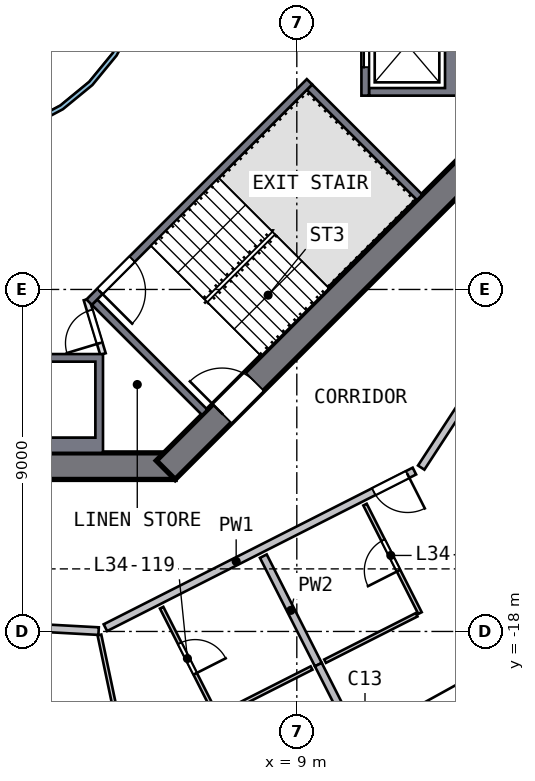
"""IFC4 building model, lengths in metres.
Left out: names, types, materials, properties, quantities, classifications, styles, units other than length and angle.
Written with IfcOpenShell. Run it as: python <this file> out.ifc"""

import sys

from ifc_helpers import new_model, si_unit, direction, frame, frame_2d, origin, place, context, subcontext, project, spatial, polyline, rectangle, outline, extrude, element, fill, save


model = new_model("IFC4")
c1 = context("Model", 3, precision=1e-05, world=origin(), true_north=direction((0.0, 1.0)))
c2 = subcontext(c1, "Body", "Model", "MODEL_VIEW")
j1 = project(units=[si_unit("LENGTHUNIT", "METRE"), si_unit("PLANEANGLEUNIT", "RADIAN")], contexts=[c1])
p1 = place(None, origin())
s1 = spatial("IfcSite", under=j1, at=p1, CompositionType="ELEMENT")
p2 = place(p1, origin())
s2 = spatial("IfcBuilding", under=s1, at=p2, CompositionType="ELEMENT")
p3 = place(p2, frame((0.0, 0.0, 143.5)))
s3 = spatial("IfcBuildingStorey", under=s2, at=p3, CompositionType="ELEMENT", Elevation=143.5)
p4 = place(p3, frame((-5.799, -13.65, 0.0), z_axis=(0.0, 0.0, 1.0), x_axis=(1.0, 0.0, 0.0)))
e1 = element("IfcWall", 1, at=p4, inside=s3, PredefinedType="SHEAR", context=c2, shape_type="SweptSolid", body=[
    extrude(rectangle(XDim=11.598, YDim=0.7, at=frame_2d((5.799, 0.0))), origin(), (0.0, 0.0, 1.0), 3.5),
])
p5 = place(p4, frame((4.899, 0.0, 0.0)))
e2 = element("IfcOpeningElement", 2, at=p5, cuts=e1, PredefinedType="OPENING", context=c2, shape_type="SweptSolid", body=[
    extrude(rectangle(XDim=1.8, YDim=2.1, at=frame_2d((0.9, 1.05))), frame((0.0, 0.36, 0.0), z_axis=(0.0, -1.0, 0.0), x_axis=(1.0, 0.0, 0.0)), (0.0, 0.0, 1.0), 0.72),
])
p6 = place(p3, frame((5.552, -13.752, 0.0), z_axis=(0.0, 0.0, 1.0), x_axis=(0.707106781, 0.707106781, 0.0)))
e3 = element("IfcWall", 3, at=p6, inside=s3, PredefinedType="SHEAR", context=c2, shape_type="SweptSolid", body=[
    extrude(rectangle(XDim=11.598, YDim=0.7, at=frame_2d((5.799, 0.0))), origin(), (0.0, 0.0, 1.0), 3.5),
])
p7 = place(p6, frame((2.099, 0.0, 0.0)))
e4 = element("IfcOpeningElement", 4, at=p7, cuts=e3, PredefinedType="OPENING", context=c2, shape_type="SweptSolid", body=[
    extrude(rectangle(XDim=1.2, YDim=2.1, at=frame_2d((0.6, 1.05))), frame((0.0, 0.36, 0.0), z_axis=(0.0, -1.0, 0.0), x_axis=(1.0, 0.0, 0.0)), (0.0, 0.0, 1.0), 0.72),
])
p8 = place(p3, origin())
e5 = element("IfcWall", 5, at=p8, inside=s3, PredefinedType="SOLIDWALL", context=c2, shape_type="SweptSolid", body=[
    extrude(outline(polyline([(13.3, -3.9), (10.9, -3.9), (10.9, -3.7), (12.9, -3.7), (12.9, -1.4), (10.9, -1.4), (10.9, -1.2), (13.3, -1.2), (13.3, -3.9)])), origin(), (0.0, 0.0, 1.0), 3.19),
])
p9 = place(p3, frame((10.8, -1.2, 0.0), z_axis=(0.0, 0.0, 1.0), x_axis=(0.0, -1.0, 0.0)))
e6 = element("IfcWall", 6, at=p9, inside=s3, PredefinedType="SOLIDWALL", context=c2, shape_type="SweptSolid", body=[
    extrude(rectangle(XDim=2.7, YDim=0.2, at=frame_2d((1.35, 0.0))), origin(), (0.0, 0.0, 1.0), 3.19),
])
p10 = place(p9, frame((0.75, 0.0, 0.0)))
e7 = element("IfcOpeningElement", 7, at=p10, cuts=e6, PredefinedType="OPENING", context=c2, shape_type="SweptSolid", body=[
    extrude(rectangle(XDim=1.2, YDim=2.1, at=frame_2d((0.6, 1.05))), frame((0.0, 0.11, 0.0), z_axis=(0.0, -1.0, 0.0), x_axis=(1.0, 0.0, 0.0)), (0.0, 0.0, 1.0), 0.22),
])
p11 = place(p3, origin())
e8 = element("IfcWall", 8, at=p11, inside=s3, PredefinedType="SOLIDWALL", context=c2, shape_type="SweptSolid", body=[
    extrude(outline(polyline([(3.9, -10.7), (3.9, -13.3), (1.2, -13.3), (1.2, -10.7), (3.9, -10.7)]), holes=[polyline([(1.4, -12.9), (3.7, -12.9), (3.7, -10.9), (1.4, -10.9), (1.4, -12.9)])]), origin(), (0.0, 0.0, 1.0), 3.19),
])
p12 = place(p3, frame((9.334, -3.535, 0.0), z_axis=(0.0, 0.0, 1.0), x_axis=(-0.707106781, -0.707106781, 0.0)))
e9 = element("IfcWall", 9, at=p12, inside=s3, PredefinedType="SOLIDWALL", context=c2, shape_type="SweptSolid", body=[
    extrude(rectangle(XDim=8.2, YDim=0.2, at=frame_2d((4.1, 0.0))), origin(), (0.0, 0.0, 1.0), 3.19),
])
p13 = place(p12, frame((6.6, 0.0, 0.0)))
e10 = element("IfcOpeningElement", 10, at=p13, cuts=e9, PredefinedType="OPENING", context=c2, shape_type="SweptSolid", body=[
    extrude(rectangle(XDim=1.2, YDim=2.1, at=frame_2d((0.6, 1.05))), frame((0.0, 0.11, 0.0), z_axis=(0.0, -1.0, 0.0), x_axis=(1.0, 0.0, 0.0)), (0.0, 0.0, 1.0), 0.22),
])
for number, where, z_axis, x_axis in (
    (11, (3.677, -9.334, 0.0), (0.0, 0.0, 1.0), (0.707, -0.707, 0.0)),
    (12, (9.334, -3.677, 0.0), (0.0, 0.0, 1.0), (0.707, -0.707, 0.0)),
):
    element("IfcWall", number, at=place(p3, frame(where, z_axis=z_axis, x_axis=x_axis)), inside=s3, PredefinedType="SOLIDWALL", context=c2, shape_type="SweptSolid", body=[
        extrude(rectangle(XDim=4.1, YDim=0.2, at=frame_2d((2.05, 0.0))), origin(), (0.0, 0.0, 1.0), 3.19),
    ])
p14 = place(p3, frame((3.9, -10.7, 0.0), z_axis=(0.0, 0.0, 1.0), x_axis=(-0.289808785, 0.957084567, 0.0)))
e13 = element("IfcWall", 13, at=p14, inside=s3, PredefinedType="PARTITIONING", context=c2, shape_type="SweptSolid", body=[
    extrude(rectangle(XDim=1.501, YDim=0.15, at=frame_2d((0.75, 0.0))), origin(), (0.0, 0.0, 1.0), 3.19),
])
p15 = place(p14, frame((0.301, 0.0, 0.0)))
e14 = element("IfcOpeningElement", 14, at=p15, cuts=e13, PredefinedType="OPENING", context=c2, shape_type="SweptSolid", body=[
    extrude(rectangle(XDim=0.9, YDim=2.1, at=frame_2d((0.45, 1.05))), frame((0.0, 0.085, 0.0), z_axis=(0.0, -1.0, 0.0), x_axis=(1.0, 0.0, 0.0)), (0.0, 0.0, 1.0), 0.17),
])
p16 = place(p3, origin())
e15 = element("IfcWall", 15, at=p16, inside=s3, PredefinedType="SOLIDWALL", context=c2, shape_type="SweptSolid", body=[
    extrude(outline(polyline([(5.021, -0.999), (4.73, -1.959), (4.257, -2.844), (3.62, -3.62), (2.844, -4.257), (1.959, -4.73), (0.999, -5.021), (0.0, -5.12), (-0.999, -5.021), (-1.959, -4.73), (-2.844, -4.257), (-3.62, -3.62), (-4.257, -2.844), (-4.73, -1.959), (-5.021, -0.999), (-5.12, 0.0), (-5.021, 0.999), (-4.73, 1.959), (-4.257, 2.844), (-3.62, 3.62), (-2.844, 4.257), (-1.959, 4.73), (-0.999, 5.021), (0.0, 5.12), (0.999, 5.021), (1.959, 4.73), (2.844, 4.257), (3.62, 3.62), (4.257, 2.844), (4.73, 1.959), (5.021, 0.999), (5.12, 0.0), (5.021, -0.999)]), holes=[polyline([(4.904, 0.976), (4.619, 1.913), (4.157, 2.778), (3.535, 3.535), (2.778, 4.157), (1.913, 4.619), (0.976, 4.904), (0.0, 5.0), (-0.976, 4.904), (-1.913, 4.619), (-2.778, 4.157), (-3.535, 3.535), (-4.157, 2.778), (-4.619, 1.913), (-4.904, 0.976), (-5.0, 0.0), (-4.904, -0.976), (-4.619, -1.913), (-4.157, -2.778), (-3.535, -3.535), (-2.778, -4.157), (-1.913, -4.619), (-0.976, -4.904), (0.0, -5.0), (0.976, -4.904), (1.913, -4.619), (2.778, -4.157), (3.535, -3.535), (4.157, -2.778), (4.619, -1.913), (4.904, -0.976), (5.0, 0.0), (4.904, 0.976)])]), origin(), (0.0, 0.0, 1.0), 3.19),
])
p17 = place(p3, frame((3.785, -17.991, 0.0), z_axis=(0.0, 0.0, 1.0), x_axis=(-0.998517128, 0.05443845, 0.0)))
e16 = element("IfcWall", 16, at=p17, inside=s3, PredefinedType="SOLIDWALL", context=c2, shape_type="SweptSolid", body=[
    extrude(rectangle(XDim=9.517, YDim=0.2, at=frame_2d((4.758, 0.0))), origin(), (0.0, 0.0, 1.0), 3.19),
])
p18 = place(p17, frame((1.9, 0.0, 0.0)))
e17 = element("IfcOpeningElement", 17, at=p18, cuts=e16, PredefinedType="OPENING", context=c2, shape_type="SweptSolid", body=[
    extrude(rectangle(XDim=1.0, YDim=2.1, at=frame_2d((0.5, 1.05))), frame((0.0, 0.11, 0.0), z_axis=(0.0, -1.0, 0.0), x_axis=(1.0, 0.0, 0.0)), (0.0, 0.0, 1.0), 0.22),
])
p19 = place(p3, frame((12.094, -13.779, 0.0), z_axis=(0.0, 0.0, 1.0), x_axis=(-0.891955141, -0.452123906, 0.0)))
e18 = element("IfcWall", 18, at=p19, inside=s3, PredefinedType="SOLIDWALL", context=c2, shape_type="SweptSolid", body=[
    extrude(rectangle(XDim=9.116, YDim=0.2, at=frame_2d((4.558, 0.0))), origin(), (0.0, 0.0, 1.0), 3.19),
])
p20 = place(p19, frame((0.2, 0.0, 0.0)))
e19 = element("IfcOpeningElement", 19, at=p20, cuts=e18, PredefinedType="OPENING", context=c2, shape_type="SweptSolid", body=[
    extrude(rectangle(XDim=1.0, YDim=2.1, at=frame_2d((0.5, 1.05))), frame((0.0, 0.11, 0.0), z_axis=(0.0, -1.0, 0.0), x_axis=(1.0, 0.0, 0.0)), (0.0, 0.0, 1.0), 0.22),
])
p21 = place(p3, frame((12.273, -13.688, 0.0), z_axis=(0.0, 0.0, 1.0), x_axis=(0.546401601, 0.837523307, 0.0)))
e20 = element("IfcWall", 20, at=p21, inside=s3, PredefinedType="SOLIDWALL", context=c2, shape_type="SweptSolid", body=[
    extrude(rectangle(XDim=9.516, YDim=0.2, at=frame_2d((4.758, 0.0))), origin(), (0.0, 0.0, 1.0), 3.19),
])
p22 = place(p3, frame((8.119, -16.018, 0.0), z_axis=(0.0, 0.0, 1.0), x_axis=(0.452120203, -0.891957018, 0.0)))
e21 = element("IfcWall", 21, at=p22, inside=s3, PredefinedType="SOLIDWALL", context=c2, shape_type="SweptSolid", body=[
    extrude(rectangle(XDim=3.2, YDim=0.2, at=frame_2d((1.6, 0.0))), origin(), (0.0, 0.0, 1.0), 3.19),
])
p23 = place(p3, frame((9.566, -18.872, 0.0), z_axis=(0.0, 0.0, 1.0), x_axis=(0.452106151, -0.89196414, 0.0)))
e22 = element("IfcWall", 22, at=p23, inside=s3, PredefinedType="SOLIDWALL", context=c2, shape_type="SweptSolid", body=[
    extrude(rectangle(XDim=2.95, YDim=0.2, at=frame_2d((1.475, 0.0))), origin(), (0.0, 0.0, 1.0), 3.19),
])
p24 = place(p3, frame((3.806, -18.092, 0.0), z_axis=(0.0, 0.0, 1.0), x_axis=(0.205843277, -0.978584971, 0.0)))
e23 = element("IfcWall", 23, at=p24, inside=s3, PredefinedType="PARTITIONING", context=c2, shape_type="SweptSolid", body=[
    extrude(rectangle(XDim=6.476, YDim=0.1, at=frame_2d((3.238, 0.0))), origin(), (0.0, 0.0, 1.0), 3.19),
])
p25 = place(p24, frame((3.55, 0.0, 0.0)))
e24 = element("IfcOpeningElement", 24, at=p25, cuts=e23, PredefinedType="OPENING", context=c2, shape_type="SweptSolid", body=[
    extrude(rectangle(XDim=1.0, YDim=2.1, at=frame_2d((0.5, 1.05))), frame((0.0, 0.06, 0.0), z_axis=(0.0, -1.0, 0.0), x_axis=(1.0, 0.0, 0.0)), (0.0, 0.0, 1.0), 0.12),
])
p26 = place(p3, frame((5.444, -17.375, 0.0), z_axis=(0.0, 0.0, 1.0), x_axis=(0.452120203, -0.891957018, 0.0)))
e25 = element("IfcWall", 25, at=p26, inside=s3, PredefinedType="PARTITIONING", context=c2, shape_type="SweptSolid", body=[
    extrude(rectangle(XDim=3.2, YDim=0.1, at=frame_2d((1.6, 0.0))), origin(), (0.0, 0.0, 1.0), 3.19),
])
p27 = place(p26, frame((1.05, 0.0, 0.0)))
e26 = element("IfcOpeningElement", 26, at=p27, cuts=e25, PredefinedType="OPENING", context=c2, shape_type="SweptSolid", body=[
    extrude(rectangle(XDim=0.9, YDim=2.1, at=frame_2d((0.45, 1.05))), frame((0.0, 0.06, 0.0), z_axis=(0.0, -1.0, 0.0), x_axis=(1.0, 0.0, 0.0)), (0.0, 0.0, 1.0), 0.12),
])
for number, where, z_axis, x_axis in (
    (27, (6.979, -20.183, 0.0), (0.0, 0.0, 1.0), (0.892, 0.452, 0.0)),
    (28, (12.153, -17.561, 0.0), (0.0, 0.0, 1.0), (-0.892, -0.452, 0.0)),
):
    element("IfcWall", number, at=place(p3, frame(where, z_axis=z_axis, x_axis=x_axis)), inside=s3, PredefinedType="PARTITIONING", context=c2, shape_type="SweptSolid", body=[
        extrude(rectangle(XDim=2.7, YDim=0.1, at=frame_2d((1.35, 0.0))), origin(), (0.0, 0.0, 1.0), 3.19),
    ])
p28 = place(p3, frame((12.242, -17.516, 0.0), z_axis=(0.0, 0.0, 1.0), x_axis=(-0.452120203, 0.891957018, 0.0)))
e29 = element("IfcWall", 29, at=p28, inside=s3, PredefinedType="PARTITIONING", context=c2, shape_type="SweptSolid", body=[
    extrude(rectangle(XDim=3.2, YDim=0.1, at=frame_2d((1.6, 0.0))), origin(), (0.0, 0.0, 1.0), 3.19),
])
p29 = place(p28, frame((1.25, 0.0, 0.0)))
e30 = element("IfcOpeningElement", 30, at=p29, cuts=e29, PredefinedType="OPENING", context=c2, shape_type="SweptSolid", body=[
    extrude(rectangle(XDim=0.9, YDim=2.1, at=frame_2d((0.45, 1.05))), frame((0.0, 0.06, 0.0), z_axis=(0.0, -1.0, 0.0), x_axis=(1.0, 0.0, 0.0)), (0.0, 0.0, 1.0), 0.12),
])
p30 = place(p10, origin())
e31 = element("IfcDoor", 31, at=p30, inside=s3, OperationType="DOUBLE_DOOR_SLIDING", PredefinedType="DOOR", context=c2, shape_type="SweptSolid", body=[
    extrude(rectangle(XDim=1.2, YDim=2.1, at=frame_2d((0.6, 1.05))), frame((0.0, 0.025, 0.0), z_axis=(0.0, -1.0, 0.0), x_axis=(1.0, 0.0, 0.0)), (0.0, 0.0, 1.0), 0.05),
])
fill(e7, e31)
p31 = place(p13, origin())
e32 = element("IfcDoor", 32, at=p31, inside=s3, OperationType="SINGLE_SWING_RIGHT", PredefinedType="DOOR", context=c2, shape_type="SweptSolid", body=[
    extrude(rectangle(XDim=1.2, YDim=2.1, at=frame_2d((0.6, 1.05))), frame((0.0, 0.025, 0.0), z_axis=(0.0, -1.0, 0.0), x_axis=(1.0, 0.0, 0.0)), (0.0, 0.0, 1.0), 0.05),
])
fill(e10, e32)
p32 = place(p7, origin())
e33 = element("IfcDoor", 33, at=p32, inside=s3, OperationType="SINGLE_SWING_LEFT", PredefinedType="DOOR", context=c2, shape_type="SweptSolid", body=[
    extrude(rectangle(XDim=1.2, YDim=2.1, at=frame_2d((0.6, 1.05))), frame((0.0, 0.025, 0.0), z_axis=(0.0, -1.0, 0.0), x_axis=(1.0, 0.0, 0.0)), (0.0, 0.0, 1.0), 0.05),
])
fill(e4, e33)
p33 = place(p15, origin())
e34 = element("IfcDoor", 34, at=p33, inside=s3, OperationType="SINGLE_SWING_LEFT", PredefinedType="DOOR", context=c2, shape_type="SweptSolid", body=[
    extrude(rectangle(XDim=0.9, YDim=2.1, at=frame_2d((0.45, 1.05))), frame((0.0, 0.025, 0.0), z_axis=(0.0, -1.0, 0.0), x_axis=(1.0, 0.0, 0.0)), (0.0, 0.0, 1.0), 0.05),
])
fill(e14, e34)
p34 = place(p27, origin())
e35 = element("IfcDoor", 35, at=p34, inside=s3, OperationType="SINGLE_SWING_RIGHT", PredefinedType="DOOR", context=c2, shape_type="SweptSolid", body=[
    extrude(rectangle(XDim=0.9, YDim=2.1, at=frame_2d((0.45, 1.05))), frame((0.0, 0.025, 0.0), z_axis=(0.0, -1.0, 0.0), x_axis=(1.0, 0.0, 0.0)), (0.0, 0.0, 1.0), 0.05),
])
fill(e26, e35)
p35 = place(p20, origin())
e36 = element("IfcDoor", 36, at=p35, inside=s3, OperationType="SINGLE_SWING_LEFT", PredefinedType="DOOR", context=c2, shape_type="SweptSolid", body=[
    extrude(rectangle(XDim=1.0, YDim=2.1, at=frame_2d((0.5, 1.05))), frame((0.0, 0.025, 0.0), z_axis=(0.0, -1.0, 0.0), x_axis=(1.0, 0.0, 0.0)), (0.0, 0.0, 1.0), 0.05),
])
fill(e19, e36)
p36 = place(p29, origin())
e37 = element("IfcDoor", 37, at=p36, inside=s3, OperationType="SINGLE_SWING_LEFT", PredefinedType="DOOR", context=c2, shape_type="SweptSolid", body=[
    extrude(rectangle(XDim=0.9, YDim=2.1, at=frame_2d((0.45, 1.05))), frame((0.0, 0.025, 0.0), z_axis=(0.0, -1.0, 0.0), x_axis=(1.0, 0.0, 0.0)), (0.0, 0.0, 1.0), 0.05),
])
fill(e30, e37)
save(model, sys.argv[1])
